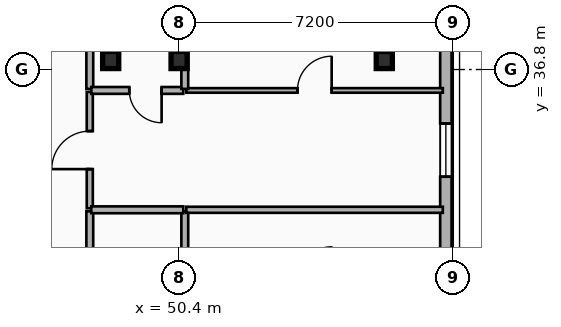
"""IFC4 building model, lengths in metres.
Left out: names, types, materials, properties, quantities, classifications, styles, units other than length and angle.
Written with IfcOpenShell. Run it as: python <this file> out.ifc"""

import sys

from ifc_helpers import new_model, si_unit, direction, frame, frame_2d, origin, origin_2d, place, context, subcontext, project, spatial, rectangle, i_section, extrude, element, fill, save


model = new_model("IFC4")
c1 = context("Model", 3, precision=1e-05, world=origin(), true_north=direction((0.0, 1.0)))
c2 = subcontext(c1, "Body", "Model", "MODEL_VIEW")
j1 = project(units=[si_unit("LENGTHUNIT", "METRE"), si_unit("PLANEANGLEUNIT", "RADIAN")], contexts=[c1])
p1 = place(None, origin())
s1 = spatial("IfcSite", under=j1, at=p1, CompositionType="ELEMENT")
p2 = place(p1, origin())
s2 = spatial("IfcBuilding", under=s1, at=p2, CompositionType="ELEMENT")
p3 = place(p2, frame((0.0, 0.0, 46.5)))
s3 = spatial("IfcBuildingStorey", under=s2, at=p3, CompositionType="ELEMENT", Elevation=46.5)
for number, where, z_axis, x_axis in (
    (1, (48.6, 37.05, 0.0), (0.0, 0.0, 1.0), (1.0, 0.0, 0.0)),
    (2, (50.4, 37.05, 0.0), (0.0, 0.0, 1.0), (1.0, 0.0, 0.0)),
    (3, (55.8, 37.05, 0.0), (0.0, 0.0, 1.0), (1.0, 0.0, 0.0)),
):
    element("IfcColumn", number, at=place(p3, frame(where, z_axis=z_axis, x_axis=x_axis)), inside=s3, PredefinedType="COLUMN", context=c2, shape_type="SweptSolid", body=[
        extrude(i_section(OverallWidth=0.424, OverallDepth=0.45, WebThickness=0.041, FlangeThickness=0.065, FilletRadius=0.015, at=origin_2d()), origin(), (0.0, 0.0, 1.0), 3.5),
    ])
p4 = place(p3, frame((57.42, 41.0, 0.0), z_axis=(0.0, 0.0, 1.0), x_axis=(0.0, -1.0, 0.0)))
e4 = element("IfcWall", 4, at=p4, inside=s3, PredefinedType="SOLIDWALL", context=c2, shape_type="SweptSolid", body=[
    extrude(rectangle(XDim=15.2, YDim=0.3, at=frame_2d((7.6, 0.0))), origin(), (0.0, 0.0, 1.0), 3.24),
])
p5 = place(p4, frame((10.882, 0.0, 0.48)))
e5 = element("IfcOpeningElement", 5, at=p5, cuts=e4, PredefinedType="OPENING", context=c2, shape_type="SweptSolid", body=[
    extrude(rectangle(XDim=1.4, YDim=1.8, at=frame_2d((0.7, 0.9))), frame((0.0, 0.16, 0.0), z_axis=(0.0, -1.0, 0.0), x_axis=(1.0, 0.0, 0.0)), (0.0, 0.0, 1.0), 0.32),
])
p6 = place(p4, frame((5.621, 0.0, 0.48)))
e6 = element("IfcOpeningElement", 6, at=p6, cuts=e4, PredefinedType="OPENING", context=c2, shape_type="SweptSolid", body=[
    extrude(rectangle(XDim=1.4, YDim=1.8, at=frame_2d((0.7, 0.9))), frame((0.0, 0.16, 0.0), z_axis=(0.0, -1.0, 0.0), x_axis=(1.0, 0.0, 0.0)), (0.0, 0.0, 1.0), 0.32),
])
p7 = place(p3, frame((48.05, 31.276, 0.0), z_axis=(0.0, 0.0, 1.0), x_axis=(0.0, 1.0, 0.0)))
e7 = element("IfcWall", 7, at=p7, inside=s3, PredefinedType="PLUMBINGWALL", context=c2, shape_type="SweptSolid", body=[
    extrude(rectangle(XDim=1.793, YDim=0.18, at=frame_2d((0.896, 0.0))), origin(), (0.0, 0.0, 1.0), 3.24),
])
p8 = place(p3, frame((48.05, 33.149, 0.0), z_axis=(0.0, 0.0, 1.0), x_axis=(0.0, 1.0, 0.0)))
e8 = element("IfcWall", 8, at=p8, inside=s3, PredefinedType="PARTITIONING", context=c2, shape_type="SweptSolid", body=[
    extrude(rectangle(XDim=3.061, YDim=0.16, at=frame_2d((1.531, 0.0))), origin(), (0.0, 0.0, 1.0), 3.24),
])
p9 = place(p8, frame((1.031, 0.0, 0.0)))
e9 = element("IfcOpeningElement", 9, at=p9, cuts=e8, PredefinedType="OPENING", context=c2, shape_type="SweptSolid", body=[
    extrude(rectangle(XDim=1.0, YDim=2.15, at=frame_2d((0.5, 1.075))), frame((0.0, 0.09, 0.0), z_axis=(0.0, -1.0, 0.0), x_axis=(1.0, 0.0, 0.0)), (0.0, 0.0, 1.0), 0.18),
])
p10 = place(p3, frame((48.05, 36.29, 0.0), z_axis=(0.0, 0.0, 1.0), x_axis=(0.0, 1.0, 0.0)))
e10 = element("IfcWall", 10, at=p10, inside=s3, PredefinedType="PLUMBINGWALL", context=c2, shape_type="SweptSolid", body=[
    extrude(rectangle(XDim=1.57, YDim=0.18, at=frame_2d((0.785, 0.0))), origin(), (0.0, 0.0, 1.0), 2.72),
])
p11 = place(p3, frame((50.55, 31.276, 0.0), z_axis=(0.0, 0.0, 1.0), x_axis=(0.0, 1.0, 0.0)))
e11 = element("IfcWall", 11, at=p11, inside=s3, PredefinedType="PLUMBINGWALL", context=c2, shape_type="SweptSolid", body=[
    extrude(rectangle(XDim=1.793, YDim=0.18, at=frame_2d((0.896, 0.0))), origin(), (0.0, 0.0, 1.0), 2.57),
])
p12 = place(p3, frame((48.09, 33.109, 0.0), z_axis=(0.0, 0.0, 1.0), x_axis=(1.0, 0.0, 0.0)))
e12 = element("IfcWall", 12, at=p12, inside=s3, PredefinedType="PLUMBINGWALL", context=c2, shape_type="SweptSolid", body=[
    extrude(rectangle(XDim=2.42, YDim=0.18, at=frame_2d((1.21, 0.0))), origin(), (0.0, 0.0, 1.0), 2.57),
])
p13 = place(p3, frame((50.59, 33.109, 0.0), z_axis=(0.0, 0.0, 1.0), x_axis=(1.0, 0.0, 0.0)))
e13 = element("IfcWall", 13, at=p13, inside=s3, PredefinedType="PARTITIONING", context=c2, shape_type="SweptSolid", body=[
    extrude(rectangle(XDim=6.75, YDim=0.16, at=frame_2d((3.375, 0.0))), origin(), (0.0, 0.0, 1.0), 2.57),
])
p14 = place(p3, frame((50.51, 36.25, 0.0), z_axis=(0.0, 0.0, 1.0), x_axis=(-1.0, 0.0, 0.0)))
e14 = element("IfcWall", 14, at=p14, inside=s3, PredefinedType="PLUMBINGWALL", context=c2, shape_type="SweptSolid", body=[
    extrude(rectangle(XDim=2.42, YDim=0.18, at=frame_2d((1.21, 0.0))), origin(), (0.0, 0.0, 1.0), 2.57),
])
p15 = place(p14, frame((0.57, 0.0, 0.0)))
e15 = element("IfcOpeningElement", 15, at=p15, cuts=e14, PredefinedType="OPENING", context=c2, shape_type="SweptSolid", body=[
    extrude(rectangle(XDim=0.85, YDim=2.1, at=frame_2d((0.425, 1.05))), frame((0.0, 0.1, 0.0), z_axis=(0.0, -1.0, 0.0), x_axis=(1.0, 0.0, 0.0)), (0.0, 0.0, 1.0), 0.2),
])
p16 = place(p3, frame((50.59, 36.25, 0.0), z_axis=(0.0, 0.0, 1.0), x_axis=(1.0, 0.0, 0.0)))
e16 = element("IfcWall", 16, at=p16, inside=s3, PredefinedType="PARTITIONING", context=c2, shape_type="SweptSolid", body=[
    extrude(rectangle(XDim=6.75, YDim=0.12, at=frame_2d((3.375, 0.0))), origin(), (0.0, 0.0, 1.0), 2.57),
])
p17 = place(p16, frame((2.925, 0.0, 0.0)))
e17 = element("IfcOpeningElement", 17, at=p17, cuts=e16, PredefinedType="OPENING", context=c2, shape_type="SweptSolid", body=[
    extrude(rectangle(XDim=0.9, YDim=2.1, at=frame_2d((0.45, 1.05))), frame((0.0, 0.07, 0.0), z_axis=(0.0, -1.0, 0.0), x_axis=(1.0, 0.0, 0.0)), (0.0, 0.0, 1.0), 0.14),
])
p18 = place(p3, frame((50.55, 36.29, 0.0), z_axis=(0.0, 0.0, 1.0), x_axis=(0.0, 1.0, 0.0)))
e18 = element("IfcWall", 18, at=p18, inside=s3, PredefinedType="PLUMBINGWALL", context=c2, shape_type="SweptSolid", body=[
    extrude(rectangle(XDim=1.57, YDim=0.18, at=frame_2d((0.785, 0.0))), origin(), (0.0, 0.0, 1.0), 2.57),
])
p19 = place(p6, origin())
e19 = element("IfcWindow", 19, at=p19, inside=s3, PartitioningType="SINGLE_PANEL", PredefinedType="WINDOW", context=c2, shape_type="SweptSolid", body=[
    extrude(rectangle(XDim=1.4, YDim=1.8, at=frame_2d((0.7, 0.9))), frame((0.0, 0.03, 0.0), z_axis=(0.0, -1.0, 0.0), x_axis=(1.0, 0.0, 0.0)), (0.0, 0.0, 1.0), 0.06),
])
fill(e6, e19)
p20 = place(p9, origin())
e20 = element("IfcDoor", 20, at=p20, inside=s3, OperationType="SINGLE_SWING_LEFT", PredefinedType="DOOR", context=c2, shape_type="SweptSolid", body=[
    extrude(rectangle(XDim=1.0, YDim=2.15, at=frame_2d((0.5, 1.075))), frame((0.0, 0.025, 0.0), z_axis=(0.0, -1.0, 0.0), x_axis=(1.0, 0.0, 0.0)), (0.0, 0.0, 1.0), 0.05),
])
fill(e9, e20)
p21 = place(p15, origin())
e21 = element("IfcDoor", 21, at=p21, inside=s3, OperationType="SINGLE_SWING_LEFT", PredefinedType="DOOR", context=c2, shape_type="SweptSolid", body=[
    extrude(rectangle(XDim=0.85, YDim=2.1, at=frame_2d((0.425, 1.05))), frame((0.0, 0.025, 0.0), z_axis=(0.0, -1.0, 0.0), x_axis=(1.0, 0.0, 0.0)), (0.0, 0.0, 1.0), 0.05),
])
fill(e15, e21)
p22 = place(p17, origin())
e22 = element("IfcDoor", 22, at=p22, inside=s3, OperationType="SINGLE_SWING_RIGHT", PredefinedType="DOOR", context=c2, shape_type="SweptSolid", body=[
    extrude(rectangle(XDim=0.9, YDim=2.1, at=frame_2d((0.45, 1.05))), frame((0.0, 0.025, 0.0), z_axis=(0.0, -1.0, 0.0), x_axis=(1.0, 0.0, 0.0)), (0.0, 0.0, 1.0), 0.05),
])
fill(e17, e22)
save(model, sys.argv[1])
